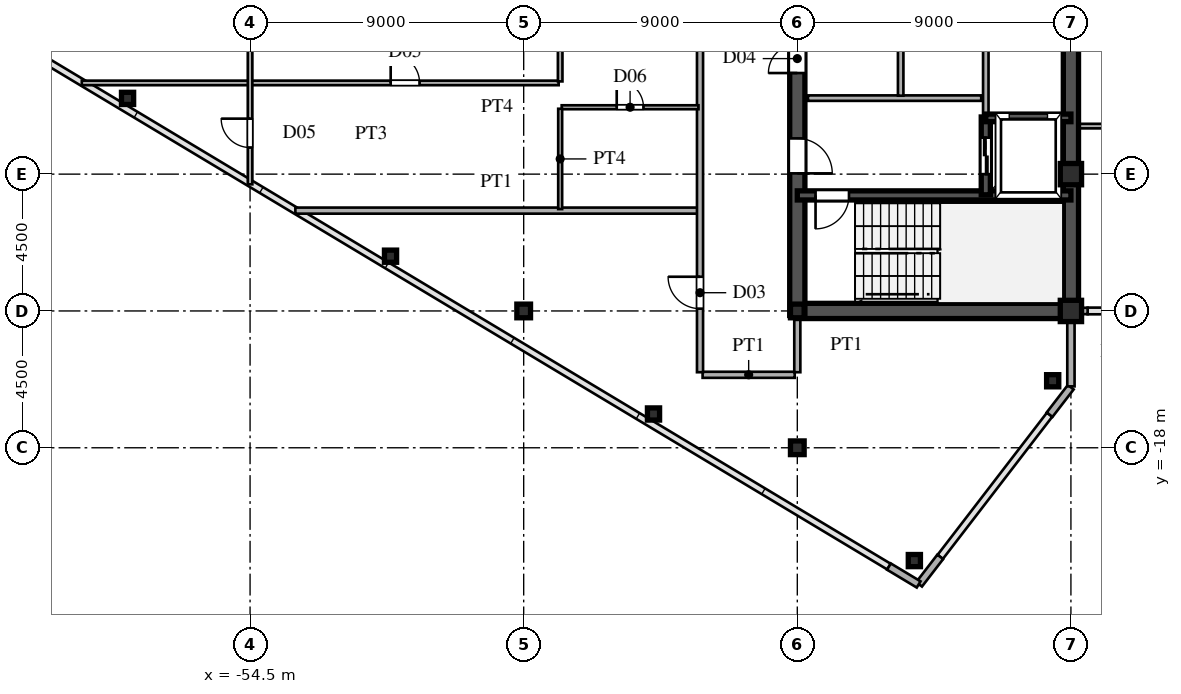
"""IFC4 building model, lengths in metres.
Left out: names, types, materials, properties, quantities, classifications, styles, units other than length and angle.
Written with IfcOpenShell. Run it as: python <this file> out.ifc"""

import sys

from ifc_helpers import new_model, si_unit, direction, frame, frame_2d, origin, origin_2d, place, context, subcontext, project, spatial, rectangle, hollow_rectangle, i_section, extrude, source, transform, mapped, element, fill, save


model = new_model("IFC4")
c1 = context("Model", 3, precision=1e-05, world=origin(), true_north=direction((0.0, 1.0)))
c2 = subcontext(c1, "Body", "Model", "MODEL_VIEW")
j1 = project(units=[si_unit("LENGTHUNIT", "METRE"), si_unit("PLANEANGLEUNIT", "RADIAN")], contexts=[c1])
p1 = place(None, origin())
s1 = spatial("IfcSite", under=j1, at=p1, CompositionType="ELEMENT")
p2 = place(p1, origin())
s2 = spatial("IfcBuilding", under=s1, at=p2, CompositionType="ELEMENT")
p3 = place(p2, frame((0.0, 0.0, 254.4)))
s3 = spatial("IfcBuildingStorey", under=s2, at=p3, CompositionType="ELEMENT", Elevation=254.4)
m1 = source(origin(), c2, "Body", "SweptSolid", [
    extrude(hollow_rectangle(XDim=0.7, YDim=0.7, WallThickness=0.03, at=origin_2d()), origin(), (0.0, 0.0, 1.0), 3.75),
])
for number, where, z_axis, x_axis in (
    (1, (-27.5, -13.5, 0.0), (0.0, 0.0, 1.0), (1.0, 0.0, 0.0)),
    (2, (-27.5, -9.0, 0.0), (0.0, 0.0, 1.0), (1.0, 0.0, 0.0)),
):
    element("IfcColumn", number, at=place(p3, frame(where, z_axis=z_axis, x_axis=x_axis)), inside=s3, PredefinedType="COLUMN", context=c2, shape_type="MappedRepresentation", body=[
        mapped(m1, transform((0.0, 0.0, 0.0), scale=1.0)),
    ])
m2 = source(origin(), c2, "Body", "SweptSolid", [
    extrude(i_section(OverallWidth=0.45, OverallDepth=0.45, WebThickness=0.016, FlangeThickness=0.025, at=origin_2d()), origin(), (0.0, 0.0, 1.0), 3.75),
])
for number, where, z_axis, x_axis in (
    (3, (-36.5, -18.0, 0.0), (0.0, 0.0, 1.0), (1.0, 0.0, 0.0)),
    (4, (-36.5, -13.5, 0.0), (0.0, 0.0, 1.0), (1.0, 0.0, 0.0)),
    (5, (-45.5, -13.5, 0.0), (0.0, 0.0, 1.0), (1.0, 0.0, 0.0)),
):
    element("IfcColumn", number, at=place(p3, frame(where, z_axis=z_axis, x_axis=x_axis)), inside=s3, PredefinedType="COLUMN", context=c2, shape_type="MappedRepresentation", body=[
        mapped(m2, transform((0.0, 0.0, 0.0), scale=1.0)),
    ])
m3 = source(origin(), c2, "Body", "SweptSolid", [
    extrude(hollow_rectangle(XDim=0.4, YDim=0.4, WallThickness=0.016, at=origin_2d()), origin(), (0.0, 0.0, 1.0), 3.75),
])
for number, where, z_axis, x_axis in (
    (6, (-28.1, -15.796, 0.0), (0.0, 0.0, 1.0), (1.0, 0.0, 0.0)),
    (7, (-32.65, -21.71, 0.0), (0.0, 0.0, 1.0), (1.0, 0.0, 0.0)),
    (8, (-41.23, -16.889, 0.0), (0.0, 0.0, 1.0), (1.0, 0.0, 0.0)),
    (9, (-49.88, -11.699, 0.0), (0.0, 0.0, 1.0), (1.0, 0.0, 0.0)),
    (10, (-58.53, -6.509, 0.0), (0.0, 0.0, 1.0), (1.0, 0.0, 0.0)),
):
    element("IfcColumn", number, at=place(p3, frame(where, z_axis=z_axis, x_axis=x_axis)), inside=s3, PredefinedType="COLUMN", context=c2, shape_type="MappedRepresentation", body=[
        mapped(m3, transform((0.0, 0.0, 0.0), scale=1.0)),
    ])
p4 = place(p3, frame((-27.5, -15.98, 0.0), z_axis=(0.0, 0.0, 1.0), x_axis=(0.0, 1.0, 0.0)))
e11 = element("IfcWall", 11, at=p4, inside=s3, PredefinedType="SOLIDWALL", context=c2, shape_type="SweptSolid", body=[
    extrude(rectangle(XDim=1.605, YDim=0.24, at=frame_2d((0.803, 0.0))), origin(), (0.0, 0.0, 1.0), 3.53),
])
p5 = place(p3, frame((-27.5, -14.375, 0.0), z_axis=(0.0, 0.0, 1.0), x_axis=(0.0, 1.0, 0.0)))
e12 = element("IfcWall", 12, at=p5, inside=s3, PredefinedType="SOLIDWALL", context=c2, shape_type="SweptSolid", body=[
    extrude(rectangle(XDim=0.62, YDim=0.24, at=frame_2d((0.31, 0.0))), origin(), (0.0, 0.0, 1.0), 3.03),
])
for number, where, z_axis, x_axis in (
    (13, (-33.486, -21.908, 0.0), (0.0, 0.0, 1.0), (0.857, -0.515, 0.0)),
    (14, (-32.494, -22.492, 0.0), (0.0, 0.0, 1.0), (0.61, 0.793, 0.0)),
    (15, (-28.201, -16.912, 0.0), (0.0, 0.0, 1.0), (0.61, 0.793, 0.0)),
):
    element("IfcWall", number, at=place(p3, frame(where, z_axis=z_axis, x_axis=x_axis)), inside=s3, PredefinedType="SOLIDWALL", context=c2, shape_type="SweptSolid", body=[
        extrude(rectangle(XDim=1.14, YDim=0.24, at=frame_2d((0.57, 0.0))), origin(), (0.0, 0.0, 1.0), 3.53),
    ])
p6 = place(p3, frame((-27.49, -13.5, 0.0), z_axis=(0.0, 0.0, 1.0), x_axis=(1.0, 0.0, 0.0)))
e16 = element("IfcWall", 16, at=p6, inside=s3, PredefinedType="SOLIDWALL", context=c2, shape_type="SweptSolid", body=[
    extrude(rectangle(XDim=0.54, YDim=0.21, at=frame_2d((0.27, 0.0))), origin(), (0.0, 0.0, 1.0), 3.03),
])
p7 = place(p3, frame((-27.5, -13.5, 0.0), z_axis=(0.0, 0.0, 1.0), x_axis=(0.0, 1.0, 0.0)))
e17 = element("IfcWall", 17, at=p7, inside=s3, PredefinedType="SHEAR", context=c2, shape_type="SweptSolid", body=[
    extrude(rectangle(XDim=12.2, YDim=0.5, at=frame_2d((6.1, 0.0))), origin(), (0.0, 0.0, 1.0), 3.53),
])
p8 = place(p3, frame((-36.5, -13.5, 0.0), z_axis=(0.0, 0.0, 1.0), x_axis=(1.0, 0.0, 0.0)))
e18 = element("IfcWall", 18, at=p8, inside=s3, PredefinedType="SHEAR", context=c2, shape_type="SweptSolid", body=[
    extrude(rectangle(XDim=9.0, YDim=0.5, at=frame_2d((4.5, 0.0))), origin(), (0.0, 0.0, 1.0), 3.53),
])
p9 = place(p3, frame((-36.5, -13.65, 0.0), z_axis=(0.0, 0.0, 1.0), x_axis=(0.0, 1.0, 0.0)))
e19 = element("IfcWall", 19, at=p9, inside=s3, PredefinedType="SHEAR", context=c2, shape_type="SweptSolid", body=[
    extrude(rectangle(XDim=7.15, YDim=0.5, at=frame_2d((3.575, 0.0))), origin(), (0.0, 0.0, 1.0), 3.53),
])
p10 = place(p9, frame((4.675, 0.0, 0.0)))
e20 = element("IfcOpeningElement", 20, at=p10, cuts=e19, PredefinedType="OPENING", context=c2, shape_type="SweptSolid", body=[
    extrude(rectangle(XDim=1.15, YDim=2.2, at=frame_2d((0.575, 1.1))), frame((0.0, 0.26, 0.0), z_axis=(0.0, -1.0, 0.0), x_axis=(1.0, 0.0, 0.0)), (0.0, 0.0, 1.0), 0.52),
])
p11 = place(p3, frame((-36.5, -6.5, 0.0), z_axis=(0.0, 0.0, 1.0), x_axis=(0.0, 1.0, 0.0)))
e21 = element("IfcWall", 21, at=p11, inside=s3, PredefinedType="SHEAR", context=c2, shape_type="SweptSolid", body=[
    extrude(rectangle(XDim=2.6, YDim=0.5, at=frame_2d((1.3, 0.0))), origin(), (0.0, 0.0, 1.0), 3.53),
])
p12 = place(p11, frame((0.825, 0.0, 0.0)))
e22 = element("IfcOpeningElement", 22, at=p12, cuts=e21, PredefinedType="OPENING", context=c2, shape_type="SweptSolid", body=[
    extrude(rectangle(XDim=0.95, YDim=2.15, at=frame_2d((0.475, 1.075))), frame((0.0, 0.26, 0.0), z_axis=(0.0, -1.0, 0.0), x_axis=(1.0, 0.0, 0.0)), (0.0, 0.0, 1.0), 0.52),
])
p13 = place(p3, frame((-36.5, -9.7, 0.0), z_axis=(0.0, 0.0, 1.0), x_axis=(1.0, 0.0, 0.0)))
e23 = element("IfcWall", 23, at=p13, inside=s3, PredefinedType="SHEAR", context=c2, shape_type="SweptSolid", body=[
    extrude(rectangle(XDim=9.0, YDim=0.3, at=frame_2d((4.5, 0.0))), origin(), (0.0, 0.0, 1.0), 3.53),
])
p14 = place(p13, frame((0.6, 0.0, 0.0)))
e24 = element("IfcOpeningElement", 24, at=p14, cuts=e23, PredefinedType="OPENING", context=c2, shape_type="SweptSolid", body=[
    extrude(rectangle(XDim=1.1, YDim=2.2, at=frame_2d((0.55, 1.1))), frame((0.0, 0.16, 0.0), z_axis=(0.0, -1.0, 0.0), x_axis=(1.0, 0.0, 0.0)), (0.0, 0.0, 1.0), 0.32),
])
p15 = place(p3, frame((-30.3, -7.15, 0.0), z_axis=(0.0, 0.0, 1.0), x_axis=(1.0, 0.0, 0.0)))
e25 = element("IfcWall", 25, at=p15, inside=s3, PredefinedType="SHEAR", context=c2, shape_type="SweptSolid", body=[
    extrude(rectangle(XDim=2.8, YDim=0.25, at=frame_2d((1.4, 0.0))), origin(), (0.0, 0.0, 1.0), 3.53),
])
p16 = place(p3, frame((-30.3, -9.68, 0.0), z_axis=(0.0, 0.0, 1.0), x_axis=(0.0, 1.0, 0.0)))
e26 = element("IfcWall", 26, at=p16, inside=s3, PredefinedType="SHEAR", context=c2, shape_type="SweptSolid", body=[
    extrude(rectangle(XDim=2.56, YDim=0.3, at=frame_2d((1.28, 0.0))), origin(), (0.0, 0.0, 1.0), 3.53),
])
p17 = place(p16, frame((0.68, 0.0, 0.0)))
e27 = element("IfcOpeningElement", 27, at=p17, cuts=e26, PredefinedType="OPENING", context=c2, shape_type="SweptSolid", body=[
    extrude(rectangle(XDim=1.2, YDim=2.25, at=frame_2d((0.6, 1.125))), frame((0.0, 0.16, 0.0), z_axis=(0.0, -1.0, 0.0), x_axis=(1.0, 0.0, 0.0)), (0.0, 0.0, 1.0), 0.32),
])
p18 = place(p3, frame((-36.15, -6.5, 0.0), z_axis=(0.0, 0.0, 1.0), x_axis=(1.0, 0.0, 0.0)))
e28 = element("IfcWall", 28, at=p18, inside=s3, PredefinedType="PARTITIONING", context=c2, shape_type="SweptSolid", body=[
    extrude(rectangle(XDim=5.7, YDim=0.18, at=frame_2d((2.85, 0.0))), origin(), (0.0, 0.0, 1.0), 3.53),
])
p19 = place(p3, frame((-33.1, -6.42, 0.0), z_axis=(0.0, 0.0, 1.0), x_axis=(0.0, 1.0, 0.0)))
e29 = element("IfcWall", 29, at=p19, inside=s3, PredefinedType="PARTITIONING", context=c2, shape_type="SweptSolid", body=[
    extrude(rectangle(XDim=5.04, YDim=0.18, at=frame_2d((2.52, 0.0))), origin(), (0.0, 0.0, 1.0), 3.53),
])
p20 = place(p3, frame((-30.3, -7.12, 0.0), z_axis=(0.0, 0.0, 1.0), x_axis=(0.0, 1.0, 0.0)))
e30 = element("IfcWall", 30, at=p20, inside=s3, PredefinedType="PARTITIONING", context=c2, shape_type="SweptSolid", body=[
    extrude(rectangle(XDim=5.74, YDim=0.18, at=frame_2d((2.87, 0.0))), origin(), (0.0, 0.0, 1.0), 3.53),
])
p21 = place(p3, frame((-39.615, -15.6, 0.0), z_axis=(0.0, 0.0, 1.0), x_axis=(1.0, 0.0, 0.0)))
e31 = element("IfcWall", 31, at=p21, inside=s3, PredefinedType="PARTITIONING", context=c2, shape_type="SweptSolid", body=[
    extrude(rectangle(XDim=3.03, YDim=0.2, at=frame_2d((1.515, 0.0))), origin(), (0.0, 0.0, 1.0), 3.53),
])
p22 = place(p3, frame((-53.01, -10.2, 0.0), z_axis=(0.0, 0.0, 1.0), x_axis=(1.0, 0.0, 0.0)))
e32 = element("IfcWall", 32, at=p22, inside=s3, PredefinedType="PARTITIONING", context=c2, shape_type="SweptSolid", body=[
    extrude(rectangle(XDim=13.23, YDim=0.2, at=frame_2d((6.615, 0.0))), origin(), (0.0, 0.0, 1.0), 3.53),
])
p23 = place(p3, frame((-27.245, -7.42, 0.0), z_axis=(0.0, 0.0, 1.0), x_axis=(1.0, 0.0, 0.0)))
e33 = element("IfcWall", 33, at=p23, inside=s3, PredefinedType="PARTITIONING", context=c2, shape_type="SweptSolid", body=[
    extrude(rectangle(XDim=7.66, YDim=0.15, at=frame_2d((3.83, 0.0))), origin(), (0.0, 0.0, 1.0), 3.53),
])
p24 = place(p23, frame((3.57, 0.0, 0.0)))
e34 = element("IfcOpeningElement", 34, at=p24, cuts=e33, PredefinedType="OPENING", context=c2, shape_type="SweptSolid", body=[
    extrude(rectangle(XDim=0.95, YDim=2.15, at=frame_2d((0.475, 1.075))), frame((0.0, 0.085, 0.0), z_axis=(0.0, -1.0, 0.0), x_axis=(1.0, 0.0, 0.0)), (0.0, 0.0, 1.0), 0.17),
])
p25 = place(p3, frame((-44.25, -6.8, 0.0), z_axis=(0.0, 0.0, 1.0), x_axis=(1.0, 0.0, 0.0)))
e35 = element("IfcWall", 35, at=p25, inside=s3, PredefinedType="PARTITIONING", context=c2, shape_type="SweptSolid", body=[
    extrude(rectangle(XDim=4.5, YDim=0.13, at=frame_2d((2.25, 0.0))), origin(), (0.0, 0.0, 1.0), 3.53),
])
p26 = place(p25, frame((1.81, 0.0, 0.0)))
e36 = element("IfcOpeningElement", 36, at=p26, cuts=e35, PredefinedType="OPENING", context=c2, shape_type="SweptSolid", body=[
    extrude(rectangle(XDim=0.88, YDim=2.1, at=frame_2d((0.44, 1.05))), frame((0.0, 0.075, 0.0), z_axis=(0.0, -1.0, 0.0), x_axis=(1.0, 0.0, 0.0)), (0.0, 0.0, 1.0), 0.15),
])
p27 = place(p3, frame((-60.035, -6.0, 0.0), z_axis=(0.0, 0.0, 1.0), x_axis=(1.0, 0.0, 0.0)))
e37 = element("IfcWall", 37, at=p27, inside=s3, PredefinedType="PARTITIONING", context=c2, shape_type="SweptSolid", body=[
    extrude(rectangle(XDim=15.685, YDim=0.15, at=frame_2d((7.842, 0.0))), origin(), (0.0, 0.0, 1.0), 3.53),
])
p28 = place(p27, frame((10.16, 0.0, 0.0)))
e38 = element("IfcOpeningElement", 38, at=p28, cuts=e37, PredefinedType="OPENING", context=c2, shape_type="SweptSolid", body=[
    extrude(rectangle(XDim=0.95, YDim=2.15, at=frame_2d((0.475, 1.075))), frame((0.0, 0.085, 0.0), z_axis=(0.0, -1.0, 0.0), x_axis=(1.0, 0.0, 0.0)), (0.0, 0.0, 1.0), 0.17),
])
p29 = place(p3, frame((-54.5, -9.335, 0.0), z_axis=(0.0, 0.0, 1.0), x_axis=(0.0, 1.0, 0.0)))
e39 = element("IfcWall", 39, at=p29, inside=s3, PredefinedType="PARTITIONING", context=c2, shape_type="SweptSolid", body=[
    extrude(rectangle(XDim=11.685, YDim=0.15, at=frame_2d((5.843, 0.0))), origin(), (0.0, 0.0, 1.0), 2.93),
])
p30 = place(p29, frame((5.107, 0.0, 0.0)))
e40 = element("IfcOpeningElement", 40, at=p30, cuts=e39, PredefinedType="OPENING", context=c2, shape_type="SweptSolid", body=[
    extrude(rectangle(XDim=0.95, YDim=2.15, at=frame_2d((0.475, 1.075))), frame((0.0, 0.085, 0.0), z_axis=(0.0, -1.0, 0.0), x_axis=(1.0, 0.0, 0.0)), (0.0, 0.0, 1.0), 0.17),
])
p31 = place(p29, frame((1.21, 0.0, 0.0)))
e41 = element("IfcOpeningElement", 41, at=p31, cuts=e39, PredefinedType="OPENING", context=c2, shape_type="SweptSolid", body=[
    extrude(rectangle(XDim=0.95, YDim=2.15, at=frame_2d((0.475, 1.075))), frame((0.0, 0.085, 0.0), z_axis=(0.0, -1.0, 0.0), x_axis=(1.0, 0.0, 0.0)), (0.0, 0.0, 1.0), 0.17),
])
p32 = place(p29, frame((9.16, 0.0, 0.0)))
e42 = element("IfcOpeningElement", 42, at=p32, cuts=e39, PredefinedType="OPENING", context=c2, shape_type="SweptSolid", body=[
    extrude(rectangle(XDim=0.95, YDim=2.15, at=frame_2d((0.475, 1.075))), frame((0.0, 0.085, 0.0), z_axis=(0.0, -1.0, 0.0), x_axis=(1.0, 0.0, 0.0)), (0.0, 0.0, 1.0), 0.17),
])
p33 = place(p3, frame((-44.3, -10.15, 0.0), z_axis=(0.0, 0.0, 1.0), x_axis=(0.0, 1.0, 0.0)))
e43 = element("IfcWall", 43, at=p33, inside=s3, PredefinedType="PARTITIONING", context=c2, shape_type="SweptSolid", body=[
    extrude(rectangle(XDim=3.3, YDim=0.13, at=frame_2d((1.65, 0.0))), origin(), (0.0, 0.0, 1.0), 3.53),
])
p34 = place(p3, frame((-44.3, -5.95, 0.0), z_axis=(0.0, 0.0, 1.0), x_axis=(0.0, 1.0, 0.0)))
e44 = element("IfcWall", 44, at=p34, inside=s3, PredefinedType="PARTITIONING", context=c2, shape_type="SweptSolid", body=[
    extrude(rectangle(XDim=4.1, YDim=0.15, at=frame_2d((2.05, 0.0))), origin(), (0.0, 0.0, 1.0), 3.53),
])
p35 = place(p34, frame((1.798, 0.0, 0.0)))
e45 = element("IfcOpeningElement", 45, at=p35, cuts=e44, PredefinedType="OPENING", context=c2, shape_type="SweptSolid", body=[
    extrude(rectangle(XDim=0.95, YDim=2.15, at=frame_2d((0.475, 1.075))), frame((0.0, 0.085, 0.0), z_axis=(0.0, -1.0, 0.0), x_axis=(1.0, 0.0, 0.0)), (0.0, 0.0, 1.0), 0.17),
])
p36 = place(p3, frame((-39.7, -15.515, 0.0), z_axis=(0.0, 0.0, 1.0), x_axis=(0.0, 1.0, 0.0)))
e46 = element("IfcWall", 46, at=p36, inside=s3, PredefinedType="PARTITIONING", context=c2, shape_type="SweptSolid", body=[
    extrude(rectangle(XDim=31.03, YDim=0.2, at=frame_2d((15.515, 0.0))), origin(), (0.0, 0.0, 1.0), 3.53),
])
p37 = place(p36, frame((2.09, 0.0, 0.0)))
e47 = element("IfcOpeningElement", 47, at=p37, cuts=e46, PredefinedType="OPENING", context=c2, shape_type="SweptSolid", body=[
    extrude(rectangle(XDim=1.05, YDim=2.25, at=frame_2d((0.525, 1.125))), frame((0.0, 0.11, 0.0), z_axis=(0.0, -1.0, 0.0), x_axis=(1.0, 0.0, 0.0)), (0.0, 0.0, 1.0), 0.22),
])
p38 = place(p36, frame((10.901, 0.0, 0.0)))
e48 = element("IfcOpeningElement", 48, at=p38, cuts=e46, PredefinedType="OPENING", context=c2, shape_type="SweptSolid", body=[
    extrude(rectangle(XDim=1.05, YDim=2.25, at=frame_2d((0.525, 1.125))), frame((0.0, 0.11, 0.0), z_axis=(0.0, -1.0, 0.0), x_axis=(1.0, 0.0, 0.0)), (0.0, 0.0, 1.0), 0.22),
])
p39 = place(p36, frame((23.99, 0.0, 0.0)))
e49 = element("IfcOpeningElement", 49, at=p39, cuts=e46, PredefinedType="OPENING", context=c2, shape_type="SweptSolid", body=[
    extrude(rectangle(XDim=1.05, YDim=2.25, at=frame_2d((0.525, 1.125))), frame((0.0, 0.11, 0.0), z_axis=(0.0, -1.0, 0.0), x_axis=(1.0, 0.0, 0.0)), (0.0, 0.0, 1.0), 0.22),
])
p40 = place(p3, frame((-36.5, -15.515, 0.0), z_axis=(0.0, 0.0, 1.0), x_axis=(0.0, 1.0, 0.0)))
e50 = element("IfcWall", 50, at=p40, inside=s3, PredefinedType="PARTITIONING", context=c2, shape_type="SweptSolid", body=[
    extrude(rectangle(XDim=1.76, YDim=0.2, at=frame_2d((0.88, 0.0))), origin(), (0.0, 0.0, 1.0), 2.93),
])
m4 = source(origin(), c2, "Body", "SweptSolid", [
    extrude(rectangle(XDim=1.15, YDim=2.2, at=frame_2d((0.575, 1.1))), frame((0.0, 0.025, 0.0), z_axis=(0.0, -1.0, 0.0), x_axis=(1.0, 0.0, 0.0)), (0.0, 0.0, 1.0), 0.05),
])
p41 = place(p10, frame((1.15, 0.0, 0.0), z_axis=(0.0, 0.0, 1.0), x_axis=(-1.0, 0.0, 0.0)))
e51 = element("IfcDoor", 51, at=p41, inside=s3, OperationType="SINGLE_SWING_LEFT", PredefinedType="DOOR", context=c2, shape_type="MappedRepresentation", body=[
    mapped(m4, transform((0.0, 0.0, 0.0), scale=1.0)),
])
fill(e20, e51)
m5 = source(origin(), c2, "Body", "SweptSolid", [
    extrude(rectangle(XDim=0.95, YDim=2.15, at=frame_2d((0.475, 1.075))), frame((0.0, 0.025, 0.0), z_axis=(0.0, -1.0, 0.0), x_axis=(1.0, 0.0, 0.0)), (0.0, 0.0, 1.0), 0.05),
])
p42 = place(p12, origin())
e52 = element("IfcDoor", 52, at=p42, inside=s3, OperationType="SINGLE_SWING_LEFT", PredefinedType="DOOR", context=c2, shape_type="MappedRepresentation", body=[
    mapped(m5, transform((0.0, 0.0, 0.0), scale=1.0)),
])
fill(e22, e52)
m6 = source(origin(), c2, "Body", "SweptSolid", [
    extrude(rectangle(XDim=1.1, YDim=2.2, at=frame_2d((0.55, 1.1))), frame((0.0, 0.025, 0.0), z_axis=(0.0, -1.0, 0.0), x_axis=(1.0, 0.0, 0.0)), (0.0, 0.0, 1.0), 0.05),
])
p43 = place(p14, frame((1.1, 0.0, 0.0), z_axis=(0.0, 0.0, 1.0), x_axis=(-1.0, 0.0, 0.0)))
e53 = element("IfcDoor", 53, at=p43, inside=s3, OperationType="SINGLE_SWING_LEFT", PredefinedType="DOOR", context=c2, shape_type="MappedRepresentation", body=[
    mapped(m6, transform((0.0, 0.0, 0.0), scale=1.0)),
])
fill(e24, e53)
m7 = source(origin(), c2, "Body", "SweptSolid", [
    extrude(rectangle(XDim=1.2, YDim=2.25, at=frame_2d((0.6, 1.125))), frame((0.0, 0.025, 0.0), z_axis=(0.0, -1.0, 0.0), x_axis=(1.0, 0.0, 0.0)), (0.0, 0.0, 1.0), 0.05),
])
p44 = place(p17, origin())
e54 = element("IfcDoor", 54, at=p44, inside=s3, OperationType="DOUBLE_DOOR_SLIDING", PredefinedType="DOOR", context=c2, shape_type="MappedRepresentation", body=[
    mapped(m7, transform((0.0, 0.0, 0.0), scale=1.0)),
])
fill(e27, e54)
m8 = source(origin(), c2, "Body", "SweptSolid", [
    extrude(rectangle(XDim=0.88, YDim=2.1, at=frame_2d((0.44, 1.05))), frame((0.0, 0.025, 0.0), z_axis=(0.0, -1.0, 0.0), x_axis=(1.0, 0.0, 0.0)), (0.0, 0.0, 1.0), 0.05),
])
p45 = place(p26, origin())
e55 = element("IfcDoor", 55, at=p45, inside=s3, OperationType="SINGLE_SWING_LEFT", PredefinedType="DOOR", context=c2, shape_type="MappedRepresentation", body=[
    mapped(m8, transform((0.0, 0.0, 0.0), scale=1.0)),
])
fill(e36, e55)
m9 = source(origin(), c2, "Body", "SweptSolid", [
    extrude(rectangle(XDim=0.95, YDim=2.15, at=frame_2d((0.475, 1.075))), frame((0.0, 0.025, 0.0), z_axis=(0.0, -1.0, 0.0), x_axis=(1.0, 0.0, 0.0)), (0.0, 0.0, 1.0), 0.05),
])
p46 = place(p28, origin())
e56 = element("IfcDoor", 56, at=p46, inside=s3, OperationType="SINGLE_SWING_LEFT", PredefinedType="DOOR", context=c2, shape_type="MappedRepresentation", body=[
    mapped(m9, transform((0.0, 0.0, 0.0), scale=1.0)),
])
fill(e38, e56)
p47 = place(p31, origin())
e57 = element("IfcDoor", 57, at=p47, inside=s3, OperationType="SINGLE_SWING_RIGHT", PredefinedType="DOOR", context=c2, shape_type="MappedRepresentation", body=[
    mapped(m9, transform((0.0, 0.0, 0.0), scale=1.0)),
])
fill(e41, e57)
m10 = source(origin(), c2, "Body", "SweptSolid", [
    extrude(rectangle(XDim=1.05, YDim=2.25, at=frame_2d((0.525, 1.125))), frame((0.0, 0.025, 0.0), z_axis=(0.0, -1.0, 0.0), x_axis=(1.0, 0.0, 0.0)), (0.0, 0.0, 1.0), 0.05),
])
p48 = place(p37, origin())
e58 = element("IfcDoor", 58, at=p48, inside=s3, OperationType="SINGLE_SWING_RIGHT", PredefinedType="DOOR", context=c2, shape_type="MappedRepresentation", body=[
    mapped(m10, transform((0.0, 0.0, 0.0), scale=1.0)),
])
fill(e47, e58)
save(model, sys.argv[1])
